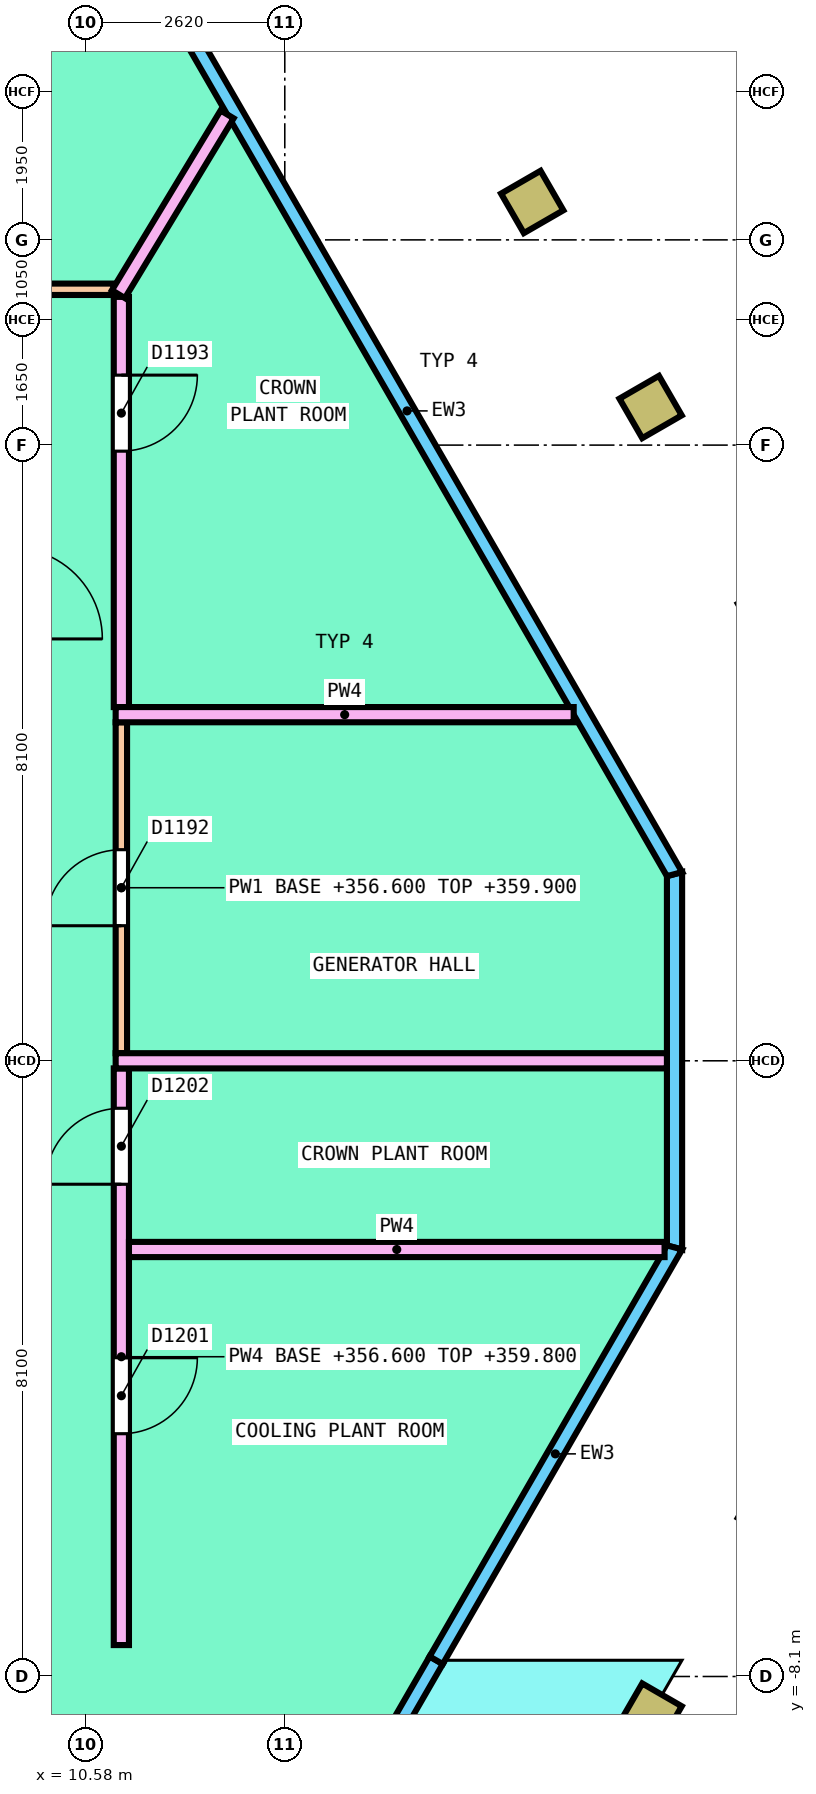
"""IFC4 building model, lengths in metres.
Left out: names, types, materials, properties, quantities, classifications, styles, units other than length and angle.
Written with IfcOpenShell. Run it as: python <this file> out.ifc"""

import sys

from ifc_helpers import new_model, si_unit, direction, frame, frame_2d, origin, origin_2d, place, context, subcontext, project, spatial, polyline, rectangle, hollow_rectangle, outline, extrude, element, fill, save


model = new_model("IFC4")
c1 = context("Model", 3, precision=1e-05, world=origin(), true_north=direction((0.0, 1.0)))
c2 = subcontext(c1, "Body", "Model", "MODEL_VIEW")
j1 = project(units=[si_unit("LENGTHUNIT", "METRE"), si_unit("PLANEANGLEUNIT", "RADIAN")], contexts=[c1])
p1 = place(None, origin())
s1 = spatial("IfcSite", under=j1, at=p1, CompositionType="ELEMENT")
p2 = place(p1, origin())
s2 = spatial("IfcBuilding", under=s1, at=p2, CompositionType="ELEMENT")
p3 = place(p2, frame((0.0, 0.0, 356.6)))
s3 = spatial("IfcBuildingStorey", under=s2, at=p3, CompositionType="ELEMENT", Elevation=356.6)
for number, where, z_axis, x_axis in (
    (1, (18.013, 8.601, 0.0), (0.0, 0.0, 1.0), (-0.5, 0.866, 0.0)),
    (2, (16.455, 11.299, 0.0), (0.0, 0.0, 1.0), (-0.5, 0.866, 0.0)),
):
    element("IfcColumn", number, at=place(p3, frame(where, z_axis=z_axis, x_axis=x_axis)), inside=s3, PredefinedType="COLUMN", context=c2, shape_type="SweptSolid", body=[
        extrude(hollow_rectangle(XDim=0.6, YDim=0.6, WallThickness=0.04, InnerFilletRadius=0.04, OuterFilletRadius=0.08, at=origin_2d()), origin(), (0.0, 0.0, 1.0), 4.0),
    ])
p4 = place(p3, frame((18.013, -8.601, 0.0), z_axis=(0.0, 0.0, 1.0), x_axis=(0.5, 0.866025403784, 0.0)))
e3 = element("IfcColumn", 3, at=p4, inside=s3, PredefinedType="COLUMN", context=c2, shape_type="SweptSolid", body=[
    extrude(hollow_rectangle(XDim=0.6, YDim=0.6, WallThickness=0.04, InnerFilletRadius=0.04, OuterFilletRadius=0.08, at=origin_2d()), origin(), (0.0, 0.0, 1.0), 2.604),
])
p5 = place(p3, frame((18.327, -2.456, 0.0), z_axis=(0.0, 0.0, 1.0), x_axis=(0.0, 1.0, 0.0)))
e4 = element("IfcWall", 4, at=p5, inside=s3, PredefinedType="SOLIDWALL", context=c2, shape_type="SweptSolid", body=[
    extrude(outline(polyline([(-0.027, -0.1), (4.938, -0.1), (4.885, 0.1), (0.027, 0.1), (-0.027, -0.1)])), origin(), (0.0, 0.0, 1.0), 3.8),
])
p6 = place(p3, frame((18.327, 2.456, 0.0), z_axis=(0.0, 0.0, 1.0), x_axis=(-0.499991740577, 0.866030172312, 0.0)))
e5 = element("IfcWall", 5, at=p6, inside=s3, PredefinedType="SOLIDWALL", context=c2, shape_type="SweptSolid", body=[
    extrude(outline(polyline([(-0.027, -0.1), (14.101, -0.1), (14.047, 0.1), (0.027, 0.1), (-0.027, -0.1)])), origin(), (0.0, 0.0, 1.0), 3.8),
])
p7 = place(p3, frame((13.514, -10.793, 0.0), z_axis=(0.0, 0.0, 1.0), x_axis=(0.499989072476, 0.866031712701, 0.0)))
e6 = element("IfcWall", 6, at=p7, inside=s3, PredefinedType="SOLIDWALL", context=c2, shape_type="SweptSolid", body=[
    extrude(outline(polyline([(0.0, 0.0), (3.355, 0.0), (3.356, 4.0), (0.0, 0.03), (0.0, 0.0)])), frame((0.0, 0.1, 0.0), z_axis=(0.0, -1.0, 0.0), x_axis=(1.0, 0.0, 0.0)), (0.0, 0.0, 1.0), 0.2),
])
p8 = place(p3, frame((15.192, -7.887, 0.0), z_axis=(0.0, 0.0, 1.0), x_axis=(0.499995423472, 0.866028046028, 0.0)))
e7 = element("IfcWall", 7, at=p8, inside=s3, PredefinedType="SOLIDWALL", context=c2, shape_type="SweptSolid", body=[
    extrude(outline(polyline([(0.0, -0.1), (6.298, -0.1), (6.244, 0.1), (0.0, 0.1), (0.0, -0.1)])), origin(), (0.0, 0.0, 1.0), 3.8),
])
p9 = place(p3, frame((11.05, 0.1, 0.0), z_axis=(0.0, 0.0, 1.0), x_axis=(0.0, 1.0, 0.0)))
e8 = element("IfcWall", 8, at=p9, inside=s3, PredefinedType="PARTITIONING", context=c2, shape_type="SweptSolid", body=[
    extrude(rectangle(XDim=4.354, YDim=0.15, at=frame_2d((2.177, 0.0))), origin(), (0.0, 0.0, 1.0), 3.3),
])
p10 = place(p9, frame((1.677, 0.0, 0.0)))
e9 = element("IfcOpeningElement", 9, at=p10, cuts=e8, PredefinedType="OPENING", context=c2, shape_type="SweptSolid", body=[
    extrude(rectangle(XDim=1.0, YDim=2.1, at=frame_2d((0.5, 1.05))), frame((0.0, 0.085, 0.0), z_axis=(0.0, -1.0, 0.0), x_axis=(1.0, 0.0, 0.0)), (0.0, 0.0, 1.0), 0.17),
])
p11 = place(p3, frame((-1.458, 10.15, 0.0), z_axis=(0.0, 0.0, 1.0), x_axis=(1.0, 0.0, 0.0)))
e10 = element("IfcWall", 10, at=p11, inside=s3, PredefinedType="PARTITIONING", context=c2, shape_type="SweptSolid", body=[
    extrude(rectangle(XDim=12.407, YDim=0.15, at=frame_2d((6.204, 0.0))), origin(), (0.0, 0.0, 1.0), 3.3),
])
p12 = place(p11, frame((5.291, 0.0, 0.0)))
e11 = element("IfcOpeningElement", 11, at=p12, cuts=e10, PredefinedType="OPENING", context=c2, shape_type="SweptSolid", body=[
    extrude(rectangle(XDim=1.2, YDim=2.1, at=frame_2d((0.6, 1.05))), frame((0.0, 0.085, 0.0), z_axis=(0.0, -1.0, 0.0), x_axis=(1.0, 0.0, 0.0)), (0.0, 0.0, 1.0), 0.17),
])
p13 = place(p3, frame((11.05, -7.687, 0.0), z_axis=(0.0, 0.0, 1.0), x_axis=(0.0, 1.0, 0.0)))
e12 = element("IfcWall", 12, at=p13, inside=s3, PredefinedType="PARTITIONING", context=c2, shape_type="SweptSolid", body=[
    extrude(rectangle(XDim=7.586, YDim=0.2, at=frame_2d((3.793, 0.0))), origin(), (0.0, 0.0, 1.0), 3.2),
])
p14 = place(p13, frame((2.78, 0.0, 0.0)))
e13 = element("IfcOpeningElement", 13, at=p14, cuts=e12, PredefinedType="OPENING", context=c2, shape_type="SweptSolid", body=[
    extrude(rectangle(XDim=1.0, YDim=2.1, at=frame_2d((0.5, 1.05))), frame((0.0, 0.11, 0.0), z_axis=(0.0, -1.0, 0.0), x_axis=(1.0, 0.0, 0.0)), (0.0, 0.0, 1.0), 0.22),
])
p15 = place(p13, frame((6.063, 0.0, 0.0)))
e14 = element("IfcOpeningElement", 14, at=p15, cuts=e12, PredefinedType="OPENING", context=c2, shape_type="SweptSolid", body=[
    extrude(rectangle(XDim=1.0, YDim=2.1, at=frame_2d((0.5, 1.05))), frame((0.0, 0.11, 0.0), z_axis=(0.0, -1.0, 0.0), x_axis=(1.0, 0.0, 0.0)), (0.0, 0.0, 1.0), 0.22),
])
p16 = place(p3, frame((11.05, 4.654, 0.0), z_axis=(0.0, 0.0, 1.0), x_axis=(0.0, 1.0, 0.0)))
e15 = element("IfcWall", 15, at=p16, inside=s3, PredefinedType="PARTITIONING", context=c2, shape_type="SweptSolid", body=[
    extrude(rectangle(XDim=5.396, YDim=0.2, at=frame_2d((2.698, 0.0))), origin(), (0.0, 0.0, 1.0), 3.3),
])
p17 = place(p16, frame((3.367, 0.0, 0.0)))
e16 = element("IfcOpeningElement", 16, at=p17, cuts=e15, PredefinedType="OPENING", context=c2, shape_type="SweptSolid", body=[
    extrude(rectangle(XDim=1.0, YDim=2.1, at=frame_2d((0.5, 1.05))), frame((0.0, 0.11, 0.0), z_axis=(0.0, -1.0, 0.0), x_axis=(1.0, 0.0, 0.0)), (0.0, 0.0, 1.0), 0.22),
])
p18 = place(p3, frame((10.975, 4.554, 0.0), z_axis=(0.0, 0.0, 1.0), x_axis=(1.0, 0.0, 0.0)))
e17 = element("IfcWall", 17, at=p18, inside=s3, PredefinedType="PARTITIONING", context=c2, shape_type="SweptSolid", body=[
    extrude(rectangle(XDim=6.026, YDim=0.2, at=frame_2d((3.013, 0.0))), origin(), (0.0, 0.0, 1.0), 3.3),
])
p19 = place(p3, frame((10.975, 0.0, 0.0), z_axis=(0.0, 0.0, 1.0), x_axis=(1.0, 0.0, 0.0)))
e18 = element("IfcWall", 18, at=p19, inside=s3, PredefinedType="PARTITIONING", context=c2, shape_type="SweptSolid", body=[
    extrude(rectangle(XDim=7.252, YDim=0.2, at=frame_2d((3.626, 0.0))), origin(), (0.0, 0.0, 1.0), 3.3),
])
p20 = place(p3, frame((11.011, 10.086, 0.0), z_axis=(0.0, 0.0, 1.0), x_axis=(0.517428364129, 0.855726526406, 0.0)))
e19 = element("IfcWall", 19, at=p20, inside=s3, PredefinedType="PARTITIONING", context=c2, shape_type="SweptSolid", body=[
    extrude(rectangle(XDim=2.764, YDim=0.2, at=frame_2d((1.382, 0.0))), origin(), (0.0, 0.0, 1.0), 3.3),
])
p21 = place(p3, frame((11.15, -2.483, 0.0), z_axis=(0.0, 0.0, 1.0), x_axis=(1.0, 0.0, 0.0)))
e20 = element("IfcWall", 20, at=p21, inside=s3, PredefinedType="PARTITIONING", context=c2, shape_type="SweptSolid", body=[
    extrude(rectangle(XDim=7.047, YDim=0.2, at=frame_2d((3.523, 0.0))), origin(), (0.0, 0.0, 1.0), 3.3),
])
p22 = place(p10, origin())
e21 = element("IfcDoor", 21, at=p22, inside=s3, OperationType="SINGLE_SWING_RIGHT", PredefinedType="DOOR", context=c2, shape_type="SweptSolid", body=[
    extrude(rectangle(XDim=1.0, YDim=2.1, at=frame_2d((0.5, 1.05))), frame((0.0, 0.025, 0.0), z_axis=(0.0, -1.0, 0.0), x_axis=(1.0, 0.0, 0.0)), (0.0, 0.0, 1.0), 0.05),
])
fill(e9, e21)
p23 = place(p17, origin())
e22 = element("IfcDoor", 22, at=p23, inside=s3, OperationType="SINGLE_SWING_RIGHT", PredefinedType="DOOR", context=c2, shape_type="SweptSolid", body=[
    extrude(rectangle(XDim=1.0, YDim=2.1, at=frame_2d((0.5, 1.05))), frame((0.0, 0.025, 0.0), z_axis=(0.0, -1.0, 0.0), x_axis=(1.0, 0.0, 0.0)), (0.0, 0.0, 1.0), 0.05),
])
fill(e16, e22)
p24 = place(p14, origin())
e23 = element("IfcDoor", 23, at=p24, inside=s3, OperationType="SINGLE_SWING_LEFT", PredefinedType="DOOR", context=c2, shape_type="SweptSolid", body=[
    extrude(rectangle(XDim=1.0, YDim=2.1, at=frame_2d((0.5, 1.05))), frame((0.0, 0.025, 0.0), z_axis=(0.0, -1.0, 0.0), x_axis=(1.0, 0.0, 0.0)), (0.0, 0.0, 1.0), 0.05),
])
fill(e13, e23)
p25 = place(p15, origin())
e24 = element("IfcDoor", 24, at=p25, inside=s3, OperationType="SINGLE_SWING_LEFT", PredefinedType="DOOR", context=c2, shape_type="SweptSolid", body=[
    extrude(rectangle(XDim=1.0, YDim=2.1, at=frame_2d((0.5, 1.05))), frame((0.0, 0.025, 0.0), z_axis=(0.0, -1.0, 0.0), x_axis=(1.0, 0.0, 0.0)), (0.0, 0.0, 1.0), 0.05),
])
fill(e14, e24)
save(model, sys.argv[1])
